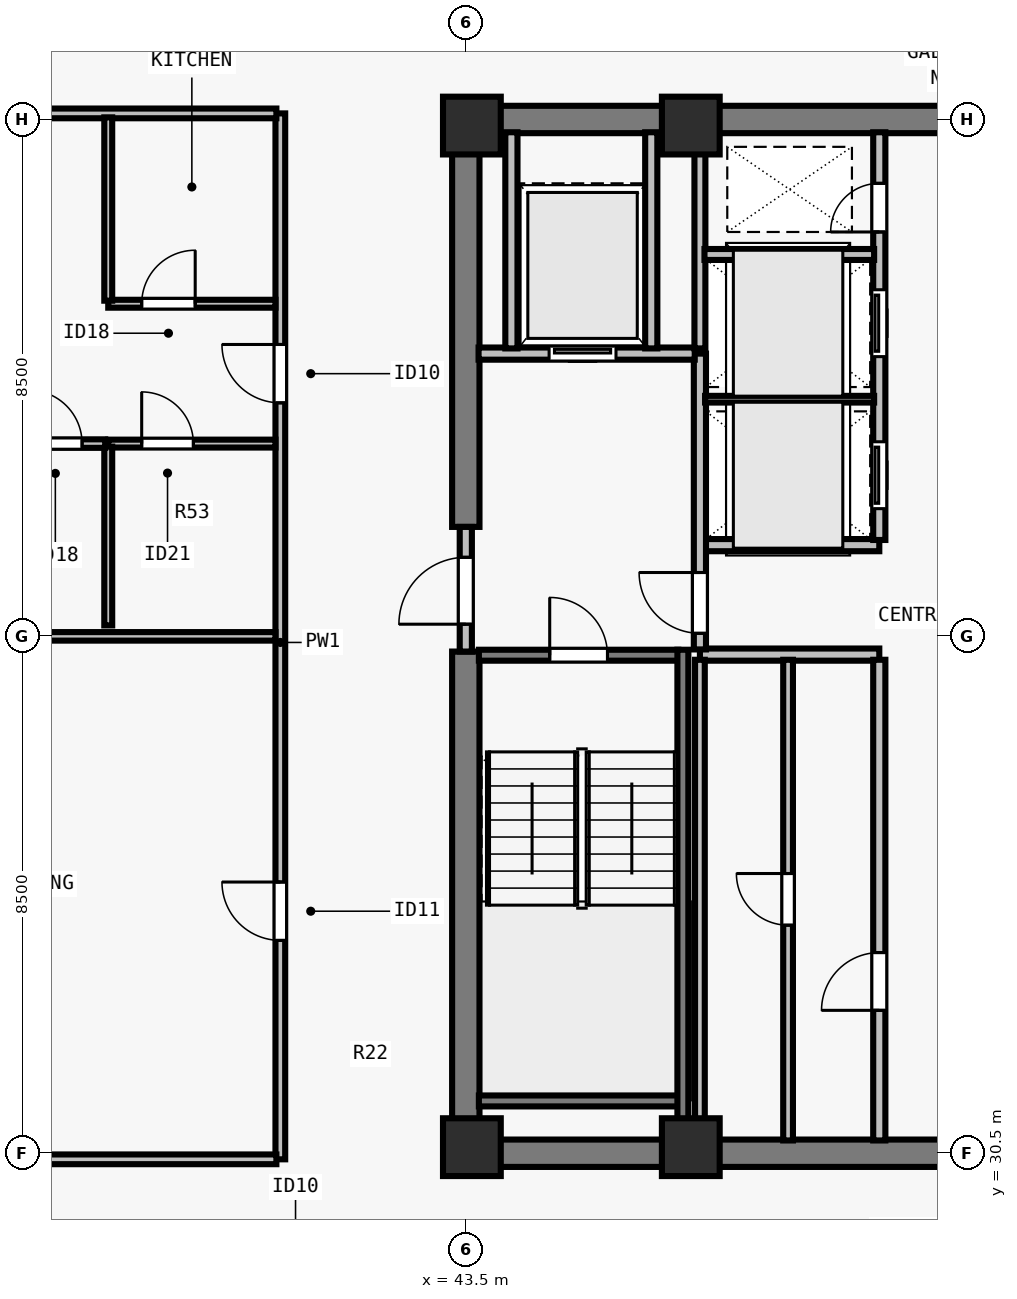
"""IFC4 building model, lengths in metres.
Left out: names, types, materials, properties, quantities, classifications, styles, units other than length and angle.
Written with IfcOpenShell. Run it as: python <this file> out.ifc"""

import sys

from ifc_helpers import new_model, si_unit, direction, frame, frame_2d, origin, origin_2d, place, context, subcontext, project, spatial, rectangle, extrude, element, fill, save


model = new_model("IFC4")
c1 = context("Model", 3, precision=1e-05, world=origin(), true_north=direction((0.0, 1.0)))
c2 = subcontext(c1, "Body", "Model", "MODEL_VIEW")
j1 = project(units=[si_unit("LENGTHUNIT", "METRE"), si_unit("PLANEANGLEUNIT", "RADIAN")], contexts=[c1])
p1 = place(None, origin())
s1 = spatial("IfcSite", under=j1, at=p1, CompositionType="ELEMENT")
p2 = place(p1, origin())
s2 = spatial("IfcBuilding", under=s1, at=p2, CompositionType="ELEMENT")
p3 = place(p2, frame((0.0, 0.0, 272.5)))
s3 = spatial("IfcBuildingStorey", under=s2, at=p3, CompositionType="ELEMENT", Elevation=272.5)
for number, where, z_axis, x_axis in (
    (1, (43.6, 30.6, 0.0), (0.0, 0.0, 1.0), (1.0, 0.0, 0.0)),
    (2, (47.2, 30.6, 0.0), (0.0, 0.0, 1.0), (1.0, 0.0, 0.0)),
    (3, (43.6, 47.4, 0.0), (0.0, 0.0, 1.0), (1.0, 0.0, 0.0)),
    (4, (47.2, 47.4, 0.0), (0.0, 0.0, 1.0), (1.0, 0.0, 0.0)),
):
    element("IfcColumn", number, at=place(p3, frame(where, z_axis=z_axis, x_axis=x_axis)), inside=s3, PredefinedType="COLUMN", context=c2, shape_type="SweptSolid", body=[
        extrude(rectangle(XDim=0.95, YDim=0.95, at=origin_2d()), origin(), (0.0, 0.0, 1.0), 3.5),
    ])
for number, where, z_axis, x_axis in (
    (5, (43.275, 30.5, 0.0), (0.0, 0.0, 1.0), (1.0, 0.0, 0.0)),
    (6, (43.275, 47.5, 0.0), (0.0, 0.0, 1.0), (1.0, 0.0, 0.0)),
):
    element("IfcWall", number, at=place(p3, frame(where, z_axis=z_axis, x_axis=x_axis)), inside=s3, PredefinedType="SHEAR", context=c2, shape_type="SweptSolid", body=[
        extrude(rectangle(XDim=17.45, YDim=0.45, at=frame_2d((8.725, 0.0))), origin(), (0.0, 0.0, 1.0), 3.24),
    ])
p4 = place(p3, frame((43.5, 30.715, 0.0), z_axis=(0.0, 0.0, 1.0), x_axis=(0.0, 1.0, 0.0)))
e7 = element("IfcWall", 7, at=p4, inside=s3, PredefinedType="SHEAR", context=c2, shape_type="SweptSolid", body=[
    extrude(rectangle(XDim=8.035, YDim=0.45, at=frame_2d((4.018, 0.0))), origin(), (0.0, 0.0, 1.0), 3.24),
])
p5 = place(p3, frame((43.5, 40.8, 0.0), z_axis=(0.0, 0.0, 1.0), x_axis=(0.0, 1.0, 0.0)))
e8 = element("IfcWall", 8, at=p5, inside=s3, PredefinedType="SHEAR", context=c2, shape_type="SweptSolid", body=[
    extrude(rectangle(XDim=6.485, YDim=0.45, at=frame_2d((3.242, 0.0))), origin(), (0.0, 0.0, 1.0), 3.24),
])
for number, where, z_axis, x_axis in (
    (9, (47.35, 38.7, 0.0), (0.0, 0.0, 1.0), (1.0, 0.0, 0.0)),
    (10, (47.35, 40.5, 0.0), (0.0, 0.0, 1.0), (1.0, 0.0, 0.0)),
):
    element("IfcWall", number, at=place(p3, frame(where, z_axis=z_axis, x_axis=x_axis)), inside=s3, PredefinedType="SOLIDWALL", context=c2, shape_type="SweptSolid", body=[
        extrude(rectangle(XDim=2.95, YDim=0.2, at=frame_2d((1.475, 0.0))), origin(), (0.0, 0.0, 1.0), 3.24),
    ])
p6 = place(p3, frame((50.3, 30.71, 0.0), z_axis=(0.0, 0.0, 1.0), x_axis=(0.0, 1.0, 0.0)))
e11 = element("IfcWall", 11, at=p6, inside=s3, PredefinedType="SOLIDWALL", context=c2, shape_type="SweptSolid", body=[
    extrude(rectangle(XDim=7.905, YDim=0.2, at=frame_2d((3.953, 0.0))), origin(), (0.0, 0.0, 1.0), 3.24),
])
p7 = place(p6, frame((2.14, 0.0, 0.0)))
e12 = element("IfcOpeningElement", 12, at=p7, cuts=e11, PredefinedType="OPENING", context=c2, shape_type="SweptSolid", body=[
    extrude(rectangle(XDim=0.95, YDim=2.12, at=frame_2d((0.475, 1.06))), frame((0.0, 0.11, 0.0), z_axis=(0.0, -1.0, 0.0), x_axis=(1.0, 0.0, 0.0)), (0.0, 0.0, 1.0), 0.22),
])
p8 = place(p3, frame((50.3, 40.585, 0.0), z_axis=(0.0, 0.0, 1.0), x_axis=(0.0, 1.0, 0.0)))
e13 = element("IfcWall", 13, at=p8, inside=s3, PredefinedType="SOLIDWALL", context=c2, shape_type="SweptSolid", body=[
    extrude(rectangle(XDim=6.705, YDim=0.2, at=frame_2d((3.353, 0.0))), origin(), (0.0, 0.0, 1.0), 3.24),
])
p9 = place(p8, frame((0.515, 0.0, 0.0)))
e14 = element("IfcOpeningElement", 14, at=p9, cuts=e13, PredefinedType="OPENING", context=c2, shape_type="SweptSolid", body=[
    extrude(rectangle(XDim=1.1, YDim=2.2, at=frame_2d((0.55, 1.1))), frame((0.0, 0.11, 0.0), z_axis=(0.0, -1.0, 0.0), x_axis=(1.0, 0.0, 0.0)), (0.0, 0.0, 1.0), 0.22),
])
p10 = place(p8, frame((3.015, 0.0, 0.0)))
e15 = element("IfcOpeningElement", 15, at=p10, cuts=e13, PredefinedType="OPENING", context=c2, shape_type="SweptSolid", body=[
    extrude(rectangle(XDim=1.1, YDim=2.2, at=frame_2d((0.55, 1.1))), frame((0.0, 0.11, 0.0), z_axis=(0.0, -1.0, 0.0), x_axis=(1.0, 0.0, 0.0)), (0.0, 0.0, 1.0), 0.22),
])
p11 = place(p8, frame((5.065, 0.0, 0.0)))
e16 = element("IfcOpeningElement", 16, at=p11, cuts=e13, PredefinedType="OPENING", context=c2, shape_type="SweptSolid", body=[
    extrude(rectangle(XDim=0.8, YDim=2.08, at=frame_2d((0.4, 1.04))), frame((0.0, 0.11, 0.0), z_axis=(0.0, -1.0, 0.0), x_axis=(1.0, 0.0, 0.0)), (0.0, 0.0, 1.0), 0.22),
])
p12 = place(p3, frame((43.5, 38.75, 0.0), z_axis=(0.0, 0.0, 1.0), x_axis=(0.0, 1.0, 0.0)))
e17 = element("IfcWall", 17, at=p12, inside=s3, PredefinedType="SOLIDWALL", context=c2, shape_type="SweptSolid", body=[
    extrude(rectangle(XDim=2.05, YDim=0.2, at=frame_2d((1.025, 0.0))), origin(), (0.0, 0.0, 1.0), 3.24),
])
p13 = place(p12, frame((0.45, 0.0, 0.0)))
e18 = element("IfcOpeningElement", 18, at=p13, cuts=e17, PredefinedType="OPENING", context=c2, shape_type="SweptSolid", body=[
    extrude(rectangle(XDim=1.1, YDim=2.15, at=frame_2d((0.55, 1.075))), frame((0.0, 0.11, 0.0), z_axis=(0.0, -1.0, 0.0), x_axis=(1.0, 0.0, 0.0)), (0.0, 0.0, 1.0), 0.22),
])
p14 = place(p3, frame((47.35, 38.785, 0.0), z_axis=(0.0, 0.0, 1.0), x_axis=(0.0, 1.0, 0.0)))
e19 = element("IfcWall", 19, at=p14, inside=s3, PredefinedType="SOLIDWALL", context=c2, shape_type="SweptSolid", body=[
    extrude(rectangle(XDim=4.865, YDim=0.2, at=frame_2d((2.433, 0.0))), origin(), (0.0, 0.0, 1.0), 3.24),
])
p15 = place(p14, frame((0.265, 0.0, 0.0)))
e20 = element("IfcOpeningElement", 20, at=p15, cuts=e19, PredefinedType="OPENING", context=c2, shape_type="SweptSolid", body=[
    extrude(rectangle(XDim=1.0, YDim=2.15, at=frame_2d((0.5, 1.075))), frame((0.0, 0.11, 0.0), z_axis=(0.0, -1.0, 0.0), x_axis=(1.0, 0.0, 0.0)), (0.0, 0.0, 1.0), 0.22),
])
p16 = place(p3, frame((43.71, 43.65, 0.0), z_axis=(0.0, 0.0, 1.0), x_axis=(1.0, 0.0, 0.0)))
e21 = element("IfcWall", 21, at=p16, inside=s3, PredefinedType="SOLIDWALL", context=c2, shape_type="SweptSolid", body=[
    extrude(rectangle(XDim=3.555, YDim=0.2, at=frame_2d((1.777, 0.0))), origin(), (0.0, 0.0, 1.0), 3.24),
])
p17 = place(p16, frame((1.16, 0.0, 0.0)))
e22 = element("IfcOpeningElement", 22, at=p17, cuts=e21, PredefinedType="OPENING", context=c2, shape_type="SweptSolid", body=[
    extrude(rectangle(XDim=1.1, YDim=2.2, at=frame_2d((0.55, 1.1))), frame((0.0, 0.11, 0.0), z_axis=(0.0, -1.0, 0.0), x_axis=(1.0, 0.0, 0.0)), (0.0, 0.0, 1.0), 0.22),
])
for number, where, z_axis, x_axis in (
    (23, (46.55, 43.735, 0.0), (0.0, 0.0, 1.0), (0.0, 1.0, 0.0)),
    (24, (44.25, 43.735, 0.0), (0.0, 0.0, 1.0), (0.0, 1.0, 0.0)),
):
    element("IfcWall", number, at=place(p3, frame(where, z_axis=z_axis, x_axis=x_axis)), inside=s3, PredefinedType="SOLIDWALL", context=c2, shape_type="SweptSolid", body=[
        extrude(rectangle(XDim=3.555, YDim=0.2, at=frame_2d((1.777, 0.0))), origin(), (0.0, 0.0, 1.0), 3.24),
    ])
p18 = place(p3, frame((47.35, 30.71, 0.0), z_axis=(0.0, 0.0, 1.0), x_axis=(0.0, 1.0, 0.0)))
e25 = element("IfcWall", 25, at=p18, inside=s3, PredefinedType="PARTITIONING", context=c2, shape_type="SweptSolid", body=[
    extrude(rectangle(XDim=7.905, YDim=0.16, at=frame_2d((3.953, 0.0))), origin(), (0.0, 0.0, 1.0), 3.24),
])
p19 = place(p3, frame((48.8, 30.71, 0.0), z_axis=(0.0, 0.0, 1.0), x_axis=(0.0, 1.0, 0.0)))
e26 = element("IfcWall", 26, at=p19, inside=s3, PredefinedType="PARTITIONING", context=c2, shape_type="SweptSolid", body=[
    extrude(rectangle(XDim=7.905, YDim=0.16, at=frame_2d((3.953, 0.0))), origin(), (0.0, 0.0, 1.0), 3.24),
])
p20 = place(p19, frame((3.54, 0.0, 0.0)))
e27 = element("IfcOpeningElement", 27, at=p20, cuts=e26, PredefinedType="OPENING", context=c2, shape_type="SweptSolid", body=[
    extrude(rectangle(XDim=0.85, YDim=2.12, at=frame_2d((0.425, 1.06))), frame((0.0, 0.09, 0.0), z_axis=(0.0, -1.0, 0.0), x_axis=(1.0, 0.0, 0.0)), (0.0, 0.0, 1.0), 0.18),
])
p21 = place(p3, frame((47.35, 43.735, 0.0), z_axis=(0.0, 0.0, 1.0), x_axis=(0.0, 1.0, 0.0)))
e28 = element("IfcWall", 28, at=p21, inside=s3, PredefinedType="SOLIDWALL", context=c2, shape_type="SweptSolid", body=[
    extrude(rectangle(XDim=3.555, YDim=0.18, at=frame_2d((1.777, 0.0))), origin(), (0.0, 0.0, 1.0), 3.24),
])
p22 = place(p3, frame((47.435, 42.9, 0.0), z_axis=(0.0, 0.0, 1.0), x_axis=(1.0, 0.0, 0.0)))
e29 = element("IfcWall", 29, at=p22, inside=s3, PredefinedType="PARTITIONING", context=c2, shape_type="SweptSolid", body=[
    extrude(rectangle(XDim=2.78, YDim=0.11, at=frame_2d((1.39, 0.0))), origin(), (0.0, 0.0, 1.0), 3.24),
])
p23 = place(p3, frame((47.425, 45.28, 0.0), z_axis=(0.0, 0.0, 1.0), x_axis=(1.0, 0.0, 0.0)))
e30 = element("IfcWall", 30, at=p23, inside=s3, PredefinedType="SOLIDWALL", context=c2, shape_type="SweptSolid", body=[
    extrude(rectangle(XDim=2.79, YDim=0.18, at=frame_2d((1.395, 0.0))), origin(), (0.0, 0.0, 1.0), 3.24),
])
p24 = place(p3, frame((40.45, 30.4, 0.0), z_axis=(0.0, 0.0, 1.0), x_axis=(0.0, 1.0, 0.0)))
e31 = element("IfcWall", 31, at=p24, inside=s3, PredefinedType="PARTITIONING", context=c2, shape_type="SweptSolid", body=[
    extrude(rectangle(XDim=17.2, YDim=0.16, at=frame_2d((8.6, 0.0))), origin(), (0.0, 0.0, 1.0), 3.24),
])
p25 = place(p24, frame((3.6, 0.0, 0.0)))
e32 = element("IfcOpeningElement", 32, at=p25, cuts=e31, PredefinedType="OPENING", context=c2, shape_type="SweptSolid", body=[
    extrude(rectangle(XDim=0.96, YDim=2.12, at=frame_2d((0.48, 1.06))), frame((0.0, 0.09, 0.0), z_axis=(0.0, -1.0, 0.0), x_axis=(1.0, 0.0, 0.0)), (0.0, 0.0, 1.0), 0.18),
])
p26 = place(p24, frame((12.44, 0.0, 0.0)))
e33 = element("IfcOpeningElement", 33, at=p26, cuts=e31, PredefinedType="OPENING", context=c2, shape_type="SweptSolid", body=[
    extrude(rectangle(XDim=0.96, YDim=2.18, at=frame_2d((0.48, 1.09))), frame((0.0, 0.09, 0.0), z_axis=(0.0, -1.0, 0.0), x_axis=(1.0, 0.0, 0.0)), (0.0, 0.0, 1.0), 0.18),
])
for number, where, z_axis, x_axis in (
    (34, (29.805, 30.4, 0.0), (0.0, 0.0, 1.0), (1.0, 0.0, 0.0)),
    (35, (29.805, 47.6, 0.0), (0.0, 0.0, 1.0), (1.0, 0.0, 0.0)),
):
    element("IfcWall", number, at=place(p3, frame(where, z_axis=z_axis, x_axis=x_axis)), inside=s3, PredefinedType="PARTITIONING", context=c2, shape_type="SweptSolid", body=[
        extrude(rectangle(XDim=10.58, YDim=0.16, at=frame_2d((5.29, 0.0))), origin(), (0.0, 0.0, 1.0), 3.24),
    ])
p27 = place(p3, frame((29.805, 39.0, 0.0), z_axis=(0.0, 0.0, 1.0), x_axis=(1.0, 0.0, 0.0)))
e36 = element("IfcWall", 36, at=p27, inside=s3, PredefinedType="PARTITIONING", context=c2, shape_type="SweptSolid", body=[
    extrude(rectangle(XDim=10.565, YDim=0.14, at=frame_2d((5.283, 0.0))), origin(), (0.0, 0.0, 1.0), 2.908),
])
p28 = place(p3, frame((37.62, 42.17, 0.0), z_axis=(0.0, 0.0, 1.0), x_axis=(1.0, 0.0, 0.0)))
e37 = element("IfcWall", 37, at=p28, inside=s3, PredefinedType="PLUMBINGWALL", context=c2, shape_type="SweptSolid", body=[
    extrude(rectangle(XDim=2.75, YDim=0.13, at=frame_2d((1.375, 0.0))), origin(), (0.0, 0.0, 1.0), 2.908),
])
p29 = place(p28, frame((0.55, 0.0, 0.0)))
e38 = element("IfcOpeningElement", 38, at=p29, cuts=e37, PredefinedType="OPENING", context=c2, shape_type="SweptSolid", body=[
    extrude(rectangle(XDim=0.85, YDim=2.08, at=frame_2d((0.425, 1.04))), frame((0.0, 0.075, 0.0), z_axis=(0.0, -1.0, 0.0), x_axis=(1.0, 0.0, 0.0)), (0.0, 0.0, 1.0), 0.15),
])
p30 = place(p3, frame((37.62, 39.18, 0.0), z_axis=(0.0, 0.0, 1.0), x_axis=(0.0, 1.0, 0.0)))
e39 = element("IfcWall", 39, at=p30, inside=s3, PredefinedType="PLUMBINGWALL", context=c2, shape_type="SweptSolid", body=[
    extrude(rectangle(XDim=2.94, YDim=0.13, at=frame_2d((1.47, 0.0))), origin(), (0.0, 0.0, 1.0), 3.24),
])
p31 = place(p3, frame((37.62, 44.47, 0.0), z_axis=(0.0, 0.0, 1.0), x_axis=(1.0, 0.0, 0.0)))
e40 = element("IfcWall", 40, at=p31, inside=s3, PredefinedType="PLUMBINGWALL", context=c2, shape_type="SweptSolid", body=[
    extrude(rectangle(XDim=2.75, YDim=0.13, at=frame_2d((1.375, 0.0))), origin(), (0.0, 0.0, 1.0), 3.24),
])
p32 = place(p31, frame((0.55, 0.0, 0.0)))
e41 = element("IfcOpeningElement", 41, at=p32, cuts=e40, PredefinedType="OPENING", context=c2, shape_type="SweptSolid", body=[
    extrude(rectangle(XDim=0.88, YDim=2.1, at=frame_2d((0.44, 1.05))), frame((0.0, 0.075, 0.0), z_axis=(0.0, -1.0, 0.0), x_axis=(1.0, 0.0, 0.0)), (0.0, 0.0, 1.0), 0.15),
])
p33 = place(p3, frame((37.62, 44.52, 0.0), z_axis=(0.0, 0.0, 1.0), x_axis=(0.0, 1.0, 0.0)))
e42 = element("IfcWall", 42, at=p33, inside=s3, PredefinedType="PLUMBINGWALL", context=c2, shape_type="SweptSolid", body=[
    extrude(rectangle(XDim=3.015, YDim=0.13, at=frame_2d((1.507, 0.0))), origin(), (0.0, 0.0, 1.0), 3.24),
])
p34 = place(p3, frame((29.88, 42.17, 0.0), z_axis=(0.0, 0.0, 1.0), x_axis=(1.0, 0.0, 0.0)))
e43 = element("IfcWall", 43, at=p34, inside=s3, PredefinedType="PARTITIONING", context=c2, shape_type="SweptSolid", body=[
    extrude(rectangle(XDim=7.69, YDim=0.14, at=frame_2d((3.845, 0.0))), origin(), (0.0, 0.0, 1.0), 3.24),
])
p35 = place(p34, frame((6.43, 0.0, 0.0)))
e44 = element("IfcOpeningElement", 44, at=p35, cuts=e43, PredefinedType="OPENING", context=c2, shape_type="SweptSolid", body=[
    extrude(rectangle(XDim=0.88, YDim=2.1, at=frame_2d((0.44, 1.05))), frame((0.0, 0.08, 0.0), z_axis=(0.0, -1.0, 0.0), x_axis=(1.0, 0.0, 0.0)), (0.0, 0.0, 1.0), 0.16),
])
p36 = place(p3, frame((43.715, 38.69, 0.0), z_axis=(0.0, 0.0, 1.0), x_axis=(1.0, 0.0, 0.0)))
e45 = element("IfcWall", 45, at=p36, inside=s3, PredefinedType="SOLIDWALL", context=c2, shape_type="SweptSolid", body=[
    extrude(rectangle(XDim=3.28, YDim=0.18, at=frame_2d((1.64, 0.0))), origin(), (0.0, 0.0, 1.0), 3.24),
])
p37 = place(p36, frame((1.165, 0.0, 0.0)))
e46 = element("IfcOpeningElement", 46, at=p37, cuts=e45, PredefinedType="OPENING", context=c2, shape_type="SweptSolid", body=[
    extrude(rectangle(XDim=0.95, YDim=2.15, at=frame_2d((0.475, 1.075))), frame((0.0, 0.1, 0.0), z_axis=(0.0, -1.0, 0.0), x_axis=(1.0, 0.0, 0.0)), (0.0, 0.0, 1.0), 0.2),
])
p38 = place(p3, frame((43.715, 31.36, 0.0), z_axis=(0.0, 0.0, 1.0), x_axis=(1.0, 0.0, 0.0)))
e47 = element("IfcWall", 47, at=p38, inside=s3, PredefinedType="SOLIDWALL", context=c2, shape_type="SweptSolid", body=[
    extrude(rectangle(XDim=3.28, YDim=0.18, at=frame_2d((1.64, 0.0))), origin(), (0.0, 0.0, 1.0), 3.24),
])
p39 = place(p3, frame((47.07, 38.78, 0.0), z_axis=(0.0, 0.0, 1.0), x_axis=(0.0, -1.0, 0.0)))
e48 = element("IfcWall", 48, at=p39, inside=s3, PredefinedType="SOLIDWALL", context=c2, shape_type="SweptSolid", body=[
    extrude(rectangle(XDim=8.067, YDim=0.18, at=frame_2d((4.034, 0.0))), origin(), (0.0, 0.0, 1.0), 3.24),
])
p40 = place(p13, origin())
e49 = element("IfcDoor", 49, at=p40, inside=s3, OperationType="SINGLE_SWING_LEFT", PredefinedType="DOOR", context=c2, shape_type="SweptSolid", body=[
    extrude(rectangle(XDim=1.1, YDim=2.15, at=frame_2d((0.55, 1.075))), frame((0.0, 0.025, 0.0), z_axis=(0.0, -1.0, 0.0), x_axis=(1.0, 0.0, 0.0)), (0.0, 0.0, 1.0), 0.05),
])
fill(e18, e49)
p41 = place(p15, origin())
e50 = element("IfcDoor", 50, at=p41, inside=s3, OperationType="SINGLE_SWING_RIGHT", PredefinedType="DOOR", context=c2, shape_type="SweptSolid", body=[
    extrude(rectangle(XDim=1.0, YDim=2.15, at=frame_2d((0.5, 1.075))), frame((0.0, 0.025, 0.0), z_axis=(0.0, -1.0, 0.0), x_axis=(1.0, 0.0, 0.0)), (0.0, 0.0, 1.0), 0.05),
])
fill(e20, e50)
p42 = place(p17, origin())
e51 = element("IfcDoor", 51, at=p42, inside=s3, OperationType="SLIDING_TO_LEFT", PredefinedType="DOOR", context=c2, shape_type="SweptSolid", body=[
    extrude(rectangle(XDim=1.1, YDim=2.2, at=frame_2d((0.55, 1.1))), frame((0.0, 0.025, 0.0), z_axis=(0.0, -1.0, 0.0), x_axis=(1.0, 0.0, 0.0)), (0.0, 0.0, 1.0), 0.05),
])
fill(e22, e51)
p43 = place(p7, origin())
e52 = element("IfcDoor", 52, at=p43, inside=s3, OperationType="SINGLE_SWING_LEFT", PredefinedType="DOOR", context=c2, shape_type="SweptSolid", body=[
    extrude(rectangle(XDim=0.95, YDim=2.12, at=frame_2d((0.475, 1.06))), frame((0.0, 0.025, 0.0), z_axis=(0.0, -1.0, 0.0), x_axis=(1.0, 0.0, 0.0)), (0.0, 0.0, 1.0), 0.05),
])
fill(e12, e52)
p44 = place(p20, origin())
e53 = element("IfcDoor", 53, at=p44, inside=s3, OperationType="SINGLE_SWING_RIGHT", PredefinedType="DOOR", context=c2, shape_type="SweptSolid", body=[
    extrude(rectangle(XDim=0.85, YDim=2.12, at=frame_2d((0.425, 1.06))), frame((0.0, 0.025, 0.0), z_axis=(0.0, -1.0, 0.0), x_axis=(1.0, 0.0, 0.0)), (0.0, 0.0, 1.0), 0.05),
])
fill(e27, e53)
p45 = place(p9, origin())
e54 = element("IfcDoor", 54, at=p45, inside=s3, OperationType="SLIDING_TO_LEFT", PredefinedType="DOOR", context=c2, shape_type="SweptSolid", body=[
    extrude(rectangle(XDim=1.1, YDim=2.2, at=frame_2d((0.55, 1.1))), frame((0.0, 0.025, 0.0), z_axis=(0.0, -1.0, 0.0), x_axis=(1.0, 0.0, 0.0)), (0.0, 0.0, 1.0), 0.05),
])
fill(e14, e54)
p46 = place(p10, origin())
e55 = element("IfcDoor", 55, at=p46, inside=s3, OperationType="SLIDING_TO_LEFT", PredefinedType="DOOR", context=c2, shape_type="SweptSolid", body=[
    extrude(rectangle(XDim=1.1, YDim=2.2, at=frame_2d((0.55, 1.1))), frame((0.0, 0.025, 0.0), z_axis=(0.0, -1.0, 0.0), x_axis=(1.0, 0.0, 0.0)), (0.0, 0.0, 1.0), 0.05),
])
fill(e15, e55)
p47 = place(p11, origin())
e56 = element("IfcDoor", 56, at=p47, inside=s3, OperationType="SINGLE_SWING_LEFT", PredefinedType="DOOR", context=c2, shape_type="SweptSolid", body=[
    extrude(rectangle(XDim=0.8, YDim=2.08, at=frame_2d((0.4, 1.04))), frame((0.0, 0.025, 0.0), z_axis=(0.0, -1.0, 0.0), x_axis=(1.0, 0.0, 0.0)), (0.0, 0.0, 1.0), 0.05),
])
fill(e16, e56)
p48 = place(p25, origin())
e57 = element("IfcDoor", 57, at=p48, inside=s3, OperationType="SINGLE_SWING_RIGHT", PredefinedType="DOOR", context=c2, shape_type="SweptSolid", body=[
    extrude(rectangle(XDim=0.96, YDim=2.12, at=frame_2d((0.48, 1.06))), frame((0.0, 0.025, 0.0), z_axis=(0.0, -1.0, 0.0), x_axis=(1.0, 0.0, 0.0)), (0.0, 0.0, 1.0), 0.05),
])
fill(e32, e57)
p49 = place(p29, origin())
e58 = element("IfcDoor", 58, at=p49, inside=s3, OperationType="SINGLE_SWING_LEFT", PredefinedType="DOOR", context=c2, shape_type="SweptSolid", body=[
    extrude(rectangle(XDim=0.85, YDim=2.08, at=frame_2d((0.425, 1.04))), frame((0.0, 0.025, 0.0), z_axis=(0.0, -1.0, 0.0), x_axis=(1.0, 0.0, 0.0)), (0.0, 0.0, 1.0), 0.05),
])
fill(e38, e58)
p50 = place(p32, origin())
e59 = element("IfcDoor", 59, at=p50, inside=s3, OperationType="SINGLE_SWING_RIGHT", PredefinedType="DOOR", context=c2, shape_type="SweptSolid", body=[
    extrude(rectangle(XDim=0.88, YDim=2.1, at=frame_2d((0.44, 1.05))), frame((0.0, 0.025, 0.0), z_axis=(0.0, -1.0, 0.0), x_axis=(1.0, 0.0, 0.0)), (0.0, 0.0, 1.0), 0.05),
])
fill(e41, e59)
p51 = place(p35, origin())
e60 = element("IfcDoor", 60, at=p51, inside=s3, OperationType="SINGLE_SWING_LEFT", PredefinedType="DOOR", context=c2, shape_type="SweptSolid", body=[
    extrude(rectangle(XDim=0.88, YDim=2.1, at=frame_2d((0.44, 1.05))), frame((0.0, 0.025, 0.0), z_axis=(0.0, -1.0, 0.0), x_axis=(1.0, 0.0, 0.0)), (0.0, 0.0, 1.0), 0.05),
])
fill(e44, e60)
p52 = place(p26, origin())
e61 = element("IfcDoor", 61, at=p52, inside=s3, OperationType="SINGLE_SWING_RIGHT", PredefinedType="DOOR", context=c2, shape_type="SweptSolid", body=[
    extrude(rectangle(XDim=0.96, YDim=2.18, at=frame_2d((0.48, 1.09))), frame((0.0, 0.025, 0.0), z_axis=(0.0, -1.0, 0.0), x_axis=(1.0, 0.0, 0.0)), (0.0, 0.0, 1.0), 0.05),
])
fill(e33, e61)
p53 = place(p37, origin())
e62 = element("IfcDoor", 62, at=p53, inside=s3, OperationType="SINGLE_SWING_LEFT", PredefinedType="DOOR", context=c2, shape_type="SweptSolid", body=[
    extrude(rectangle(XDim=0.95, YDim=2.15, at=frame_2d((0.475, 1.075))), frame((0.0, 0.025, 0.0), z_axis=(0.0, -1.0, 0.0), x_axis=(1.0, 0.0, 0.0)), (0.0, 0.0, 1.0), 0.05),
])
fill(e46, e62)
save(model, sys.argv[1])
